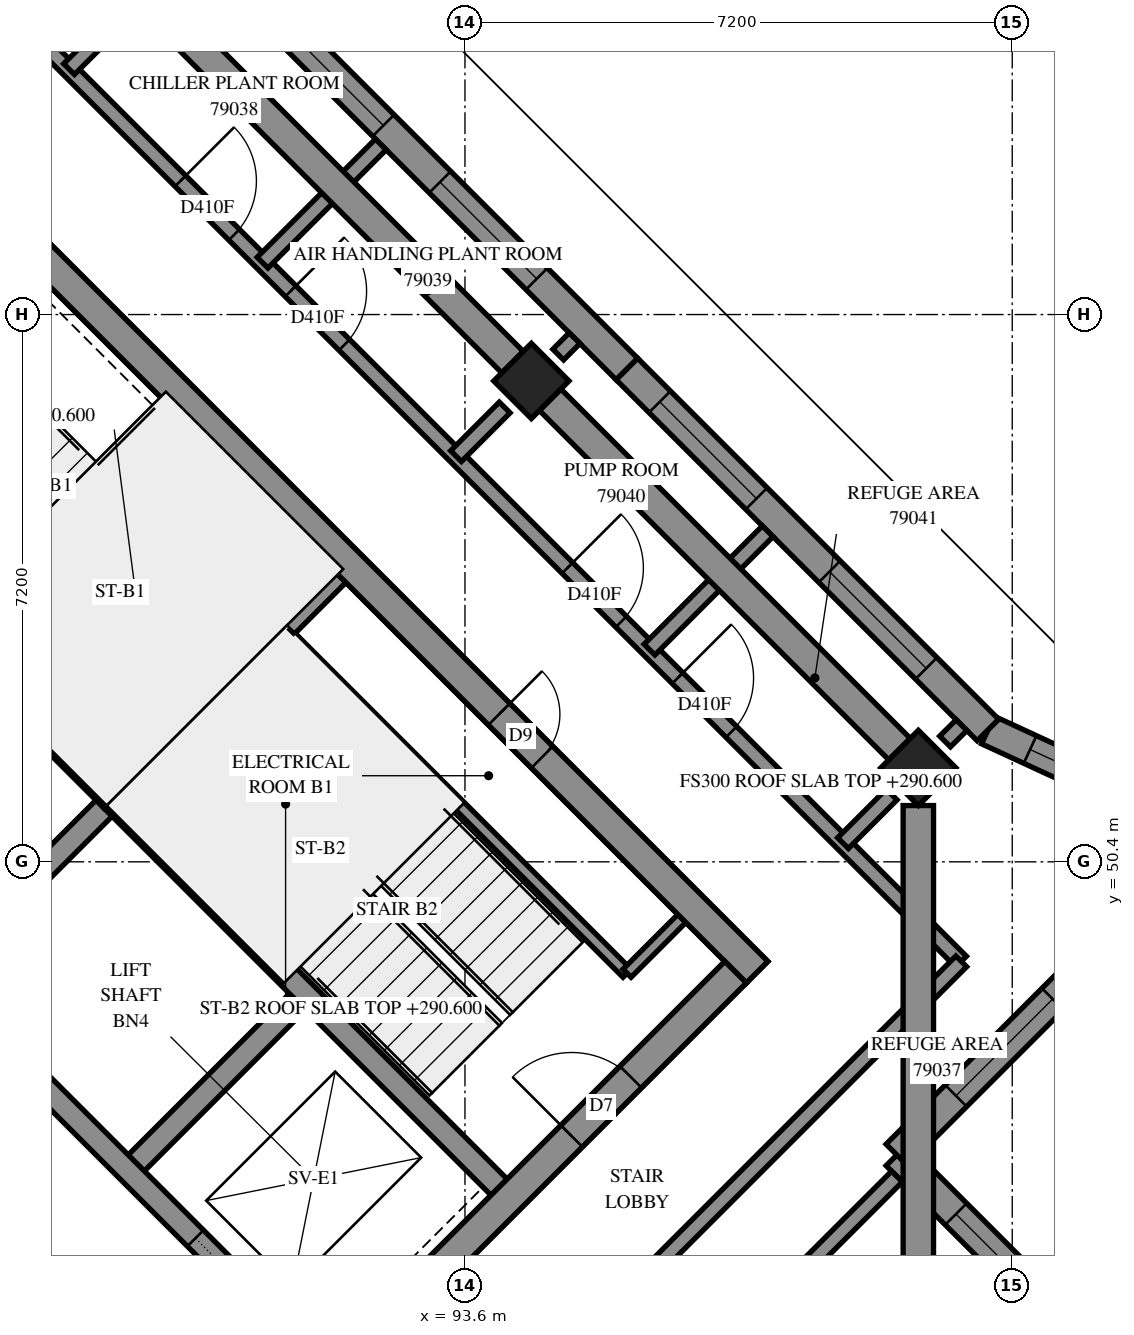
"""IFC4 building model, lengths in metres.
Left out: names, types, materials, properties, quantities, classifications, styles, units other than length and angle.
Written with IfcOpenShell. Run it as: python <this file> out.ifc"""

import sys

from ifc_helpers import new_model, si_unit, direction, frame, frame_2d, origin, origin_2d, place, context, subcontext, project, spatial, polyline, rectangle, outline, extrude, element, fill, save


model = new_model("IFC4")
c1 = context("Model", 3, precision=1e-05, world=origin(), true_north=direction((0.0, 1.0)))
c2 = subcontext(c1, "Body", "Model", "MODEL_VIEW")
j1 = project(units=[si_unit("LENGTHUNIT", "METRE"), si_unit("PLANEANGLEUNIT", "RADIAN")], contexts=[c1])
p1 = place(None, origin())
s1 = spatial("IfcSite", under=j1, at=p1, CompositionType="ELEMENT")
p2 = place(p1, origin())
s2 = spatial("IfcBuilding", under=s1, at=p2, CompositionType="ELEMENT")
p3 = place(p2, frame((0.0, 0.0, 290.6)))
s3 = spatial("IfcBuildingStorey", under=s2, at=p3, CompositionType="ELEMENT", Elevation=290.6)
for number, where, z_axis, x_axis in (
    (1, (94.474, 56.727, 0.0), (0.0, 0.0, 1.0), (0.707, -0.707, 0.0)),
    (2, (99.565, 51.635, 0.0), (0.0, 0.0, 1.0), (0.707, -0.707, 0.0)),
):
    element("IfcColumn", number, at=place(p3, frame(where, z_axis=z_axis, x_axis=x_axis)), inside=s3, PredefinedType="COLUMN", context=c2, shape_type="SweptSolid", body=[
        extrude(rectangle(XDim=0.7, YDim=0.7, at=origin_2d()), origin(), (0.0, 0.0, 1.0), 3.5),
    ])
p4 = place(p3, frame((86.695, 59.696, -0.3), z_axis=(0.0, 0.0, 1.0), x_axis=(0.7071100706, -0.7071034917, 0.0)))
e3 = element("IfcWall", 3, at=p4, inside=s3, PredefinedType="SHEAR", context=c2, shape_type="SweptSolid", body=[
    extrude(rectangle(XDim=15.2, YDim=0.4, at=frame_2d((7.6, 0.0))), origin(), (0.0, 0.0, 1.0), 3.1),
])
p5 = place(p4, frame((10.4, 0.0, 0.3)))
e4 = element("IfcOpeningElement", 4, at=p5, cuts=e3, PredefinedType="OPENING", context=c2, shape_type="SweptSolid", body=[
    extrude(rectangle(XDim=0.8, YDim=2.1, at=frame_2d((0.4, 1.05))), frame((0.0, 0.21, 0.0), z_axis=(0.0, -1.0, 0.0), x_axis=(1.0, 0.0, 0.0)), (0.0, 0.0, 1.0), 0.42),
])
p6 = place(p3, frame((86.978, 38.766, -0.3), z_axis=(0.0, 0.0, 1.0), x_axis=(0.7071067812, 0.7071067812, 0.0)))
e5 = element("IfcWall", 5, at=p6, inside=s3, PredefinedType="SHEAR", context=c2, shape_type="SweptSolid", body=[
    extrude(rectangle(XDim=14.4, YDim=0.4, at=frame_2d((7.2, 0.0))), origin(), (0.0, 0.0, 1.0), 3.1),
])
p7 = place(p6, frame((4.55, 0.0, 0.3)))
e6 = element("IfcOpeningElement", 6, at=p7, cuts=e5, PredefinedType="OPENING", context=c2, shape_type="SweptSolid", body=[
    extrude(rectangle(XDim=1.1, YDim=2.1, at=frame_2d((0.55, 1.05))), frame((0.0, 0.21, 0.0), z_axis=(0.0, -1.0, 0.0), x_axis=(1.0, 0.0, 0.0)), (0.0, 0.0, 1.0), 0.42),
])
p8 = place(p6, frame((11.35, 0.0, 0.3)))
e7 = element("IfcOpeningElement", 7, at=p8, cuts=e5, PredefinedType="OPENING", context=c2, shape_type="SweptSolid", body=[
    extrude(rectangle(XDim=1.1, YDim=2.1, at=frame_2d((0.55, 1.05))), frame((0.0, 0.21, 0.0), z_axis=(0.0, -1.0, 0.0), x_axis=(1.0, 0.0, 0.0)), (0.0, 0.0, 1.0), 0.42),
])
for number, where, z_axis, x_axis in (
    (8, (86.625, 48.878, 0.0), (0.0, 0.0, 1.0), (0.707, 0.707, 0.0)),
    (9, (89.17, 46.332, 0.0), (0.0, 0.0, 1.0), (0.707, 0.707, 0.0)),
):
    element("IfcWall", number, at=place(p3, frame(where, z_axis=z_axis, x_axis=x_axis)), inside=s3, PredefinedType="SOLIDWALL", context=c2, shape_type="SweptSolid", body=[
        extrude(rectangle(XDim=3.3, YDim=0.3, at=frame_2d((1.65, 0.0))), origin(), (0.0, 0.0, 1.0), 3.5),
    ])
p9 = place(p3, frame((78.988, 51.423, 0.0), z_axis=(0.0, 0.0, 1.0), x_axis=(0.7071067812, -0.7071067812, 0.0)))
e10 = element("IfcWall", 10, at=p9, inside=s3, PredefinedType="SOLIDWALL", context=c2, shape_type="SweptSolid", body=[
    extrude(rectangle(XDim=14.4, YDim=0.3, at=frame_2d((7.2, 0.0))), origin(), (0.0, 0.0, 1.0), 3.5),
])
p10 = place(p9, frame((12.05, 0.0, 0.0)))
e11 = element("IfcOpeningElement", 11, at=p10, cuts=e10, PredefinedType="OPENING", context=c2, shape_type="SweptSolid", body=[
    extrude(rectangle(XDim=1.1, YDim=2.1, at=frame_2d((0.55, 1.05))), frame((0.0, 0.16, 0.0), z_axis=(0.0, -1.0, 0.0), x_axis=(1.0, 0.0, 0.0)), (0.0, 0.0, 1.0), 0.32),
])
p11 = place(p3, frame((81.534, 53.969, 0.0), z_axis=(0.0, 0.0, 1.0), x_axis=(0.707103309, -0.7071102534, 0.0)))
e12 = element("IfcWall", 12, at=p11, inside=s3, PredefinedType="SOLIDWALL", context=c2, shape_type="SweptSolid", body=[
    extrude(rectangle(XDim=14.4, YDim=0.3, at=frame_2d((7.2, 0.0))), origin(), (0.0, 0.0, 1.0), 3.5),
])
p12 = place(p11, frame((12.05, 0.0, 0.0)))
e13 = element("IfcOpeningElement", 13, at=p12, cuts=e12, PredefinedType="OPENING", context=c2, shape_type="SweptSolid", body=[
    extrude(rectangle(XDim=1.1, YDim=2.1, at=frame_2d((0.55, 1.05))), frame((0.0, 0.16, 0.0), z_axis=(0.0, -1.0, 0.0), x_axis=(1.0, 0.0, 0.0)), (0.0, 0.0, 1.0), 0.32),
])
for number, where, z_axis, x_axis in (
    (14, (83.867, 56.302, 0.0), (0.0, 0.0, 1.0), (0.707, -0.707, 0.0)),
    (15, (88.958, 51.211, 0.0), (0.0, 0.0, 1.0), (0.707, -0.707, 0.0)),
):
    element("IfcWall", number, at=place(p3, frame(where, z_axis=z_axis, x_axis=x_axis)), inside=s3, PredefinedType="SOLIDWALL", context=c2, shape_type="SweptSolid", body=[
        extrude(rectangle(XDim=7.2, YDim=0.3, at=frame_2d((3.6, 0.0))), origin(), (0.0, 0.0, 1.0), 3.5),
    ])
p13 = place(p3, frame((88.958, 51.211, 0.0), z_axis=(0.0, 0.0, 1.0), x_axis=(0.7071067812, 0.7071067812, 0.0)))
e16 = element("IfcWall", 16, at=p13, inside=s3, PredefinedType="SOLIDWALL", context=c2, shape_type="SweptSolid", body=[
    extrude(rectangle(XDim=4.2, YDim=0.3, at=frame_2d((2.1, 0.0))), origin(), (0.0, 0.0, 1.0), 3.5),
])
p14 = place(p3, frame((102.676, 43.15, 0.0), z_axis=(0.0, 0.0, 1.0), x_axis=(-0.7070963646, 0.7071171977, 0.0)))
e17 = element("IfcWall", 17, at=p14, inside=s3, PredefinedType="SOLIDWALL", context=c2, shape_type="SweptSolid", body=[
    extrude(outline(polyline([(-0.2, -0.2), (4.6, -0.2), (5.0, 0.2), (0.2, 0.2), (-0.2, -0.2)])), origin(), (0.0, 0.0, 1.0), 3.5),
])
p15 = place(p14, frame((1.9, 0.0, 0.7)))
e18 = element("IfcOpeningElement", 18, at=p15, cuts=e17, PredefinedType="OPENING", context=c2, shape_type="SweptSolid", body=[
    extrude(rectangle(XDim=1.8, YDim=2.2, at=frame_2d((0.9, 1.1))), frame((0.0, 0.21, 0.0), z_axis=(0.0, -1.0, 0.0), x_axis=(1.0, 0.0, 0.0)), (0.0, 0.0, 1.0), 0.42),
])
p16 = place(p3, frame((99.282, 46.544, 0.0), z_axis=(0.0, 0.0, 1.0), x_axis=(0.7071067812, 0.7071067812, 0.0)))
e19 = element("IfcWall", 19, at=p16, inside=s3, PredefinedType="SOLIDWALL", context=c2, shape_type="SweptSolid", body=[
    extrude(outline(polyline([(0.2, -0.2), (6.23, -0.2), (5.657, 0.2), (-0.2, 0.2), (0.2, -0.2)])), origin(), (0.0, 0.0, 1.0), 3.5),
])
p17 = place(p16, frame((1.1, 0.0, 0.7)))
e20 = element("IfcOpeningElement", 20, at=p17, cuts=e19, PredefinedType="OPENING", context=c2, shape_type="SweptSolid", body=[
    extrude(rectangle(XDim=1.8, YDim=2.2, at=frame_2d((0.9, 1.1))), frame((0.0, 0.21, 0.0), z_axis=(0.0, -1.0, 0.0), x_axis=(1.0, 0.0, 0.0)), (0.0, 0.0, 1.0), 0.42),
])
p18 = place(p3, frame((103.484, 50.747, 0.0), z_axis=(0.0, 0.0, 1.0), x_axis=(-0.9078558767, 0.4192823716, 0.0)))
e21 = element("IfcWall", 21, at=p18, inside=s3, PredefinedType="SOLIDWALL", context=c2, shape_type="SweptSolid", body=[
    extrude(outline(polyline([(-0.287, -0.2), (3.273, -0.2), (3.345, 0.2), (0.287, 0.2), (-0.287, -0.2)])), origin(), (0.0, 0.0, 1.0), 3.5),
])
p19 = place(p18, frame((0.898, 0.0, 0.7)))
e22 = element("IfcOpeningElement", 22, at=p19, cuts=e21, PredefinedType="OPENING", context=c2, shape_type="SweptSolid", body=[
    extrude(rectangle(XDim=1.8, YDim=2.2, at=frame_2d((0.9, 1.1))), frame((0.0, 0.21, 0.0), z_axis=(0.0, -1.0, 0.0), x_axis=(1.0, 0.0, 0.0)), (0.0, 0.0, 1.0), 0.42),
])
p20 = place(p3, frame((100.48, 52.134, 0.0), z_axis=(0.0, 0.0, 1.0), x_axis=(-0.7071067812, 0.7071067812, 0.0)))
e23 = element("IfcWall", 23, at=p20, inside=s3, PredefinedType="SOLIDWALL", context=c2, shape_type="SweptSolid", body=[
    extrude(outline(polyline([(0.036, -0.2), (6.718, -0.2), (6.718, 0.2), (-0.036, 0.2), (0.036, -0.2)])), origin(), (0.0, 0.0, 1.0), 3.5),
])
p21 = place(p20, frame((1.147, 0.0, 0.7)))
e24 = element("IfcOpeningElement", 24, at=p21, cuts=e23, PredefinedType="OPENING", context=c2, shape_type="SweptSolid", body=[
    extrude(rectangle(XDim=1.8, YDim=2.2, at=frame_2d((0.9, 1.1))), frame((0.0, 0.21, 0.0), z_axis=(0.0, -1.0, 0.0), x_axis=(1.0, 0.0, 0.0)), (0.0, 0.0, 1.0), 0.42),
])
p22 = place(p20, frame((4.306, 0.0, 0.7)))
e25 = element("IfcOpeningElement", 25, at=p22, cuts=e23, PredefinedType="OPENING", context=c2, shape_type="SweptSolid", body=[
    extrude(rectangle(XDim=1.8, YDim=2.2, at=frame_2d((0.9, 1.1))), frame((0.0, 0.21, 0.0), z_axis=(0.0, -1.0, 0.0), x_axis=(1.0, 0.0, 0.0)), (0.0, 0.0, 1.0), 0.42),
])
p23 = place(p3, frame((95.73, 56.884, 0.0), z_axis=(0.0, 0.0, 1.0), x_axis=(-0.7071067812, 0.7071067812, 0.0)))
e26 = element("IfcWall", 26, at=p23, inside=s3, PredefinedType="SOLIDWALL", context=c2, shape_type="SweptSolid", body=[
    extrude(outline(polyline([(0.0, -0.2), (6.682, -0.2), (6.682, 0.2), (0.0, 0.2), (0.0, -0.2)])), origin(), (0.0, 0.0, 1.0), 3.5),
])
p24 = place(p23, frame((1.677, 0.0, 0.7)))
e27 = element("IfcOpeningElement", 27, at=p24, cuts=e26, PredefinedType="OPENING", context=c2, shape_type="SweptSolid", body=[
    extrude(rectangle(XDim=1.8, YDim=2.2, at=frame_2d((0.9, 1.1))), frame((0.0, 0.21, 0.0), z_axis=(0.0, -1.0, 0.0), x_axis=(1.0, 0.0, 0.0)), (0.0, 0.0, 1.0), 0.42),
])
p25 = place(p23, frame((4.529, 0.0, 0.7)))
e28 = element("IfcOpeningElement", 28, at=p25, cuts=e26, PredefinedType="OPENING", context=c2, shape_type="SweptSolid", body=[
    extrude(rectangle(XDim=1.8, YDim=2.2, at=frame_2d((0.9, 1.1))), frame((0.0, 0.21, 0.0), z_axis=(0.0, -1.0, 0.0), x_axis=(1.0, 0.0, 0.0)), (0.0, 0.0, 1.0), 0.42),
])
p26 = place(p3, frame((91.313, 53.354, 0.0), z_axis=(0.0, 0.0, 1.0), x_axis=(0.7071147811, -0.7070987812, 0.0)))
e29 = element("IfcWall", 29, at=p26, inside=s3, PredefinedType="PARTITIONING", context=c2, shape_type="SweptSolid", body=[
    extrude(rectangle(XDim=6.25, YDim=0.15, at=frame_2d((3.125, 0.0))), origin(), (0.0, 0.0, 1.0), 3.5),
])
p27 = place(p3, frame((95.732, 48.934, 0.0), z_axis=(0.0, 0.0, 1.0), x_axis=(0.7071067812, 0.7071067812, 0.0)))
e30 = element("IfcWall", 30, at=p27, inside=s3, PredefinedType="PARTITIONING", context=c2, shape_type="SweptSolid", body=[
    extrude(rectangle(XDim=1.02, YDim=0.15, at=frame_2d((0.51, 0.0))), origin(), (0.0, 0.0, 1.0), 3.5),
])
p28 = place(p3, frame((86.833, 62.381, 0.0), z_axis=(0.0, 0.0, 1.0), x_axis=(0.7071067812, -0.7071067812, 0.0)))
e31 = element("IfcWall", 31, at=p28, inside=s3, PredefinedType="PARTITIONING", context=c2, shape_type="SweptSolid", body=[
    extrude(rectangle(XDim=18.801, YDim=0.2, at=frame_2d((9.4, 0.0))), origin(), (0.0, 0.0, 1.0), 3.5),
])
p29 = place(p28, frame((4.276, 0.0, 0.0)))
e32 = element("IfcOpeningElement", 32, at=p29, cuts=e31, PredefinedType="OPENING", context=c2, shape_type="SweptSolid", body=[
    extrude(rectangle(XDim=1.0, YDim=2.1, at=frame_2d((0.5, 1.05))), frame((0.0, 0.11, 0.0), z_axis=(0.0, -1.0, 0.0), x_axis=(1.0, 0.0, 0.0)), (0.0, 0.0, 1.0), 0.22),
])
p30 = place(p28, frame((6.326, 0.0, 0.0)))
e33 = element("IfcOpeningElement", 33, at=p30, cuts=e31, PredefinedType="OPENING", context=c2, shape_type="SweptSolid", body=[
    extrude(rectangle(XDim=1.0, YDim=2.1, at=frame_2d((0.5, 1.05))), frame((0.0, 0.11, 0.0), z_axis=(0.0, -1.0, 0.0), x_axis=(1.0, 0.0, 0.0)), (0.0, 0.0, 1.0), 0.22),
])
p31 = place(p28, frame((11.476, 0.0, 0.0)))
e34 = element("IfcOpeningElement", 34, at=p31, cuts=e31, PredefinedType="OPENING", context=c2, shape_type="SweptSolid", body=[
    extrude(rectangle(XDim=1.0, YDim=2.1, at=frame_2d((0.5, 1.05))), frame((0.0, 0.11, 0.0), z_axis=(0.0, -1.0, 0.0), x_axis=(1.0, 0.0, 0.0)), (0.0, 0.0, 1.0), 0.22),
])
p32 = place(p28, frame((13.526, 0.0, 0.0)))
e35 = element("IfcOpeningElement", 35, at=p32, cuts=e31, PredefinedType="OPENING", context=c2, shape_type="SweptSolid", body=[
    extrude(rectangle(XDim=1.0, YDim=2.1, at=frame_2d((0.5, 1.05))), frame((0.0, 0.11, 0.0), z_axis=(0.0, -1.0, 0.0), x_axis=(1.0, 0.0, 0.0)), (0.0, 0.0, 1.0), 0.22),
])
p33 = place(p3, frame((94.12, 43.081, 0.0), z_axis=(0.0, 0.0, 1.0), x_axis=(0.7071067812, 0.7071067812, 0.0)))
e36 = element("IfcWall", 36, at=p33, inside=s3, PredefinedType="PARTITIONING", context=c2, shape_type="SweptSolid", body=[
    extrude(rectangle(XDim=8.499, YDim=0.2, at=frame_2d((4.25, 0.0))), origin(), (0.0, 0.0, 1.0), 3.5),
])
for number, where, z_axis, x_axis in (
    (37, (98.574, 50.646, 0.0), (0.0, 0.0, 1.0), (0.707, 0.707, 0.0)),
    (38, (88.391, 60.828, 0.0), (0.0, 0.0, 1.0), (0.707, 0.707, 0.0)),
    (39, (93.483, 55.737, 0.0), (0.0, 0.0, 1.0), (0.707, 0.707, 0.0)),
):
    element("IfcWall", number, at=place(p3, frame(where, z_axis=z_axis, x_axis=x_axis)), inside=s3, PredefinedType="PARTITIONING", context=c2, shape_type="SweptSolid", body=[
        extrude(rectangle(XDim=0.905, YDim=0.2, at=frame_2d((0.453, 0.0))), origin(), (0.0, 0.0, 1.0), 3.5),
    ])
p34 = place(p3, frame((95.111, 42.089, 0.0), z_axis=(0.0, 0.0, 1.0), x_axis=(0.7072762658, 0.7069372559, 0.0)))
e40 = element("IfcWall", 40, at=p34, inside=s3, PredefinedType="PARTITIONING", context=c2, shape_type="SweptSolid", body=[
    extrude(outline(polyline([(0.0, -0.1), (5.899, -0.1), (5.899, 0.1), (0.0, 0.1), (0.0, -0.1)])), origin(), (0.0, 0.0, 1.0), 3.5),
])
for number, where, z_axis, x_axis in (
    (41, (96.028, 53.192, 0.0), (0.0, 0.0, 1.0), (0.707, 0.708, 0.0)),
    (42, (90.937, 58.283, 0.0), (0.0, 0.0, 1.0), (0.707, 0.707, 0.0)),
):
    element("IfcWall", number, at=place(p3, frame(where, z_axis=z_axis, x_axis=x_axis)), inside=s3, PredefinedType="PARTITIONING", context=c2, shape_type="SweptSolid", body=[
        extrude(outline(polyline([(0.0, -0.1), (2.2, -0.1), (2.2, 0.1), (0.0, 0.1), (0.0, -0.1)])), origin(), (0.0, 0.0, 1.0), 3.5),
    ])
p35 = place(p3, frame((99.917, 51.983, 0.0), z_axis=(0.0, 0.0, 1.0), x_axis=(0.7087439748, 0.7054657881, 0.0)))
e43 = element("IfcWall", 43, at=p35, inside=s3, PredefinedType="PARTITIONING", context=c2, shape_type="SweptSolid", body=[
    extrude(outline(polyline([(0.0, -0.1), (0.305, -0.1), (0.305, 0.1), (0.0, 0.1), (0.0, -0.1)])), origin(), (0.0, 0.0, 1.0), 3.5),
])
p36 = place(p3, frame((94.827, 57.073, 0.0), z_axis=(0.0, 0.0, 1.0), x_axis=(0.7053010617, 0.7089079012, 0.0)))
e44 = element("IfcWall", 44, at=p36, inside=s3, PredefinedType="PARTITIONING", context=c2, shape_type="SweptSolid", body=[
    extrude(outline(polyline([(0.0, -0.1), (0.305, -0.1), (0.305, 0.1), (0.0, 0.1), (0.0, -0.1)])), origin(), (0.0, 0.0, 1.0), 3.5),
])
p37 = place(p15, origin())
e45 = element("IfcWindow", 45, at=p37, inside=s3, PartitioningType="SINGLE_PANEL", PredefinedType="WINDOW", context=c2, shape_type="SweptSolid", body=[
    extrude(rectangle(XDim=1.8, YDim=2.2, at=frame_2d((0.9, 1.1))), frame((0.0, 0.08, 0.0), z_axis=(0.0, -1.0, 0.0), x_axis=(1.0, 0.0, 0.0)), (0.0, 0.0, 1.0), 0.06),
])
fill(e18, e45)
p38 = place(p17, origin())
e46 = element("IfcWindow", 46, at=p38, inside=s3, PartitioningType="SINGLE_PANEL", PredefinedType="WINDOW", context=c2, shape_type="SweptSolid", body=[
    extrude(rectangle(XDim=1.8, YDim=2.2, at=frame_2d((0.9, 1.1))), frame((0.0, 0.08, 0.0), z_axis=(0.0, -1.0, 0.0), x_axis=(1.0, 0.0, 0.0)), (0.0, 0.0, 1.0), 0.06),
])
fill(e20, e46)
p39 = place(p19, origin())
e47 = element("IfcWindow", 47, at=p39, inside=s3, PartitioningType="SINGLE_PANEL", PredefinedType="WINDOW", context=c2, shape_type="SweptSolid", body=[
    extrude(rectangle(XDim=1.8, YDim=2.2, at=frame_2d((0.9, 1.1))), frame((0.0, 0.08, 0.0), z_axis=(0.0, -1.0, 0.0), x_axis=(1.0, 0.0, 0.0)), (0.0, 0.0, 1.0), 0.06),
])
fill(e22, e47)
p40 = place(p21, origin())
e48 = element("IfcWindow", 48, at=p40, inside=s3, PartitioningType="SINGLE_PANEL", PredefinedType="WINDOW", context=c2, shape_type="SweptSolid", body=[
    extrude(rectangle(XDim=1.8, YDim=2.2, at=frame_2d((0.9, 1.1))), frame((0.0, 0.08, 0.0), z_axis=(0.0, -1.0, 0.0), x_axis=(1.0, 0.0, 0.0)), (0.0, 0.0, 1.0), 0.06),
])
fill(e24, e48)
p41 = place(p22, origin())
e49 = element("IfcWindow", 49, at=p41, inside=s3, PartitioningType="SINGLE_PANEL", PredefinedType="WINDOW", context=c2, shape_type="SweptSolid", body=[
    extrude(rectangle(XDim=1.8, YDim=2.2, at=frame_2d((0.9, 1.1))), frame((0.0, 0.08, 0.0), z_axis=(0.0, -1.0, 0.0), x_axis=(1.0, 0.0, 0.0)), (0.0, 0.0, 1.0), 0.06),
])
fill(e25, e49)
p42 = place(p24, origin())
e50 = element("IfcWindow", 50, at=p42, inside=s3, PartitioningType="SINGLE_PANEL", PredefinedType="WINDOW", context=c2, shape_type="SweptSolid", body=[
    extrude(rectangle(XDim=1.8, YDim=2.2, at=frame_2d((0.9, 1.1))), frame((0.0, 0.08, 0.0), z_axis=(0.0, -1.0, 0.0), x_axis=(1.0, 0.0, 0.0)), (0.0, 0.0, 1.0), 0.06),
])
fill(e27, e50)
p43 = place(p25, origin())
e51 = element("IfcWindow", 51, at=p43, inside=s3, PartitioningType="SINGLE_PANEL", PredefinedType="WINDOW", context=c2, shape_type="SweptSolid", body=[
    extrude(rectangle(XDim=1.8, YDim=2.2, at=frame_2d((0.9, 1.1))), frame((0.0, 0.08, 0.0), z_axis=(0.0, -1.0, 0.0), x_axis=(1.0, 0.0, 0.0)), (0.0, 0.0, 1.0), 0.06),
])
fill(e28, e51)
p44 = place(p5, origin())
e52 = element("IfcDoor", 52, at=p44, inside=s3, OperationType="SINGLE_SWING_RIGHT", PredefinedType="DOOR", context=c2, shape_type="SweptSolid", body=[
    extrude(rectangle(XDim=0.8, YDim=2.1, at=frame_2d((0.4, 1.05))), frame((0.0, 0.025, 0.0), z_axis=(0.0, -1.0, 0.0), x_axis=(1.0, 0.0, 0.0)), (0.0, 0.0, 1.0), 0.05),
])
fill(e4, e52)
p45 = place(p8, origin())
e53 = element("IfcDoor", 53, at=p45, inside=s3, OperationType="SINGLE_SWING_RIGHT", PredefinedType="DOOR", context=c2, shape_type="SweptSolid", body=[
    extrude(rectangle(XDim=1.1, YDim=2.1, at=frame_2d((0.55, 1.05))), frame((0.0, 0.025, 0.0), z_axis=(0.0, -1.0, 0.0), x_axis=(1.0, 0.0, 0.0)), (0.0, 0.0, 1.0), 0.05),
])
fill(e7, e53)
p46 = place(p12, origin())
e54 = element("IfcDoor", 54, at=p46, inside=s3, OperationType="SLIDING_TO_RIGHT", PredefinedType="DOOR", context=c2, shape_type="SweptSolid", body=[
    extrude(rectangle(XDim=1.1, YDim=2.1, at=frame_2d((0.55, 1.05))), frame((0.0, 0.025, 0.0), z_axis=(0.0, -1.0, 0.0), x_axis=(1.0, 0.0, 0.0)), (0.0, 0.0, 1.0), 0.05),
])
fill(e13, e54)
p47 = place(p29, origin())
e55 = element("IfcDoor", 55, at=p47, inside=s3, OperationType="SINGLE_SWING_LEFT", PredefinedType="DOOR", context=c2, shape_type="SweptSolid", body=[
    extrude(rectangle(XDim=1.0, YDim=2.1, at=frame_2d((0.5, 1.05))), frame((0.0, 0.025, 0.0), z_axis=(0.0, -1.0, 0.0), x_axis=(1.0, 0.0, 0.0)), (0.0, 0.0, 1.0), 0.05),
])
fill(e32, e55)
p48 = place(p30, origin())
e56 = element("IfcDoor", 56, at=p48, inside=s3, OperationType="SINGLE_SWING_RIGHT", PredefinedType="DOOR", context=c2, shape_type="SweptSolid", body=[
    extrude(rectangle(XDim=1.0, YDim=2.1, at=frame_2d((0.5, 1.05))), frame((0.0, 0.025, 0.0), z_axis=(0.0, -1.0, 0.0), x_axis=(1.0, 0.0, 0.0)), (0.0, 0.0, 1.0), 0.05),
])
fill(e33, e56)
p49 = place(p31, origin())
e57 = element("IfcDoor", 57, at=p49, inside=s3, OperationType="SINGLE_SWING_LEFT", PredefinedType="DOOR", context=c2, shape_type="SweptSolid", body=[
    extrude(rectangle(XDim=1.0, YDim=2.1, at=frame_2d((0.5, 1.05))), frame((0.0, 0.025, 0.0), z_axis=(0.0, -1.0, 0.0), x_axis=(1.0, 0.0, 0.0)), (0.0, 0.0, 1.0), 0.05),
])
fill(e34, e57)
p50 = place(p32, origin())
e58 = element("IfcDoor", 58, at=p50, inside=s3, OperationType="SINGLE_SWING_RIGHT", PredefinedType="DOOR", context=c2, shape_type="SweptSolid", body=[
    extrude(rectangle(XDim=1.0, YDim=2.1, at=frame_2d((0.5, 1.05))), frame((0.0, 0.025, 0.0), z_axis=(0.0, -1.0, 0.0), x_axis=(1.0, 0.0, 0.0)), (0.0, 0.0, 1.0), 0.05),
])
fill(e35, e58)
save(model, sys.argv[1])
